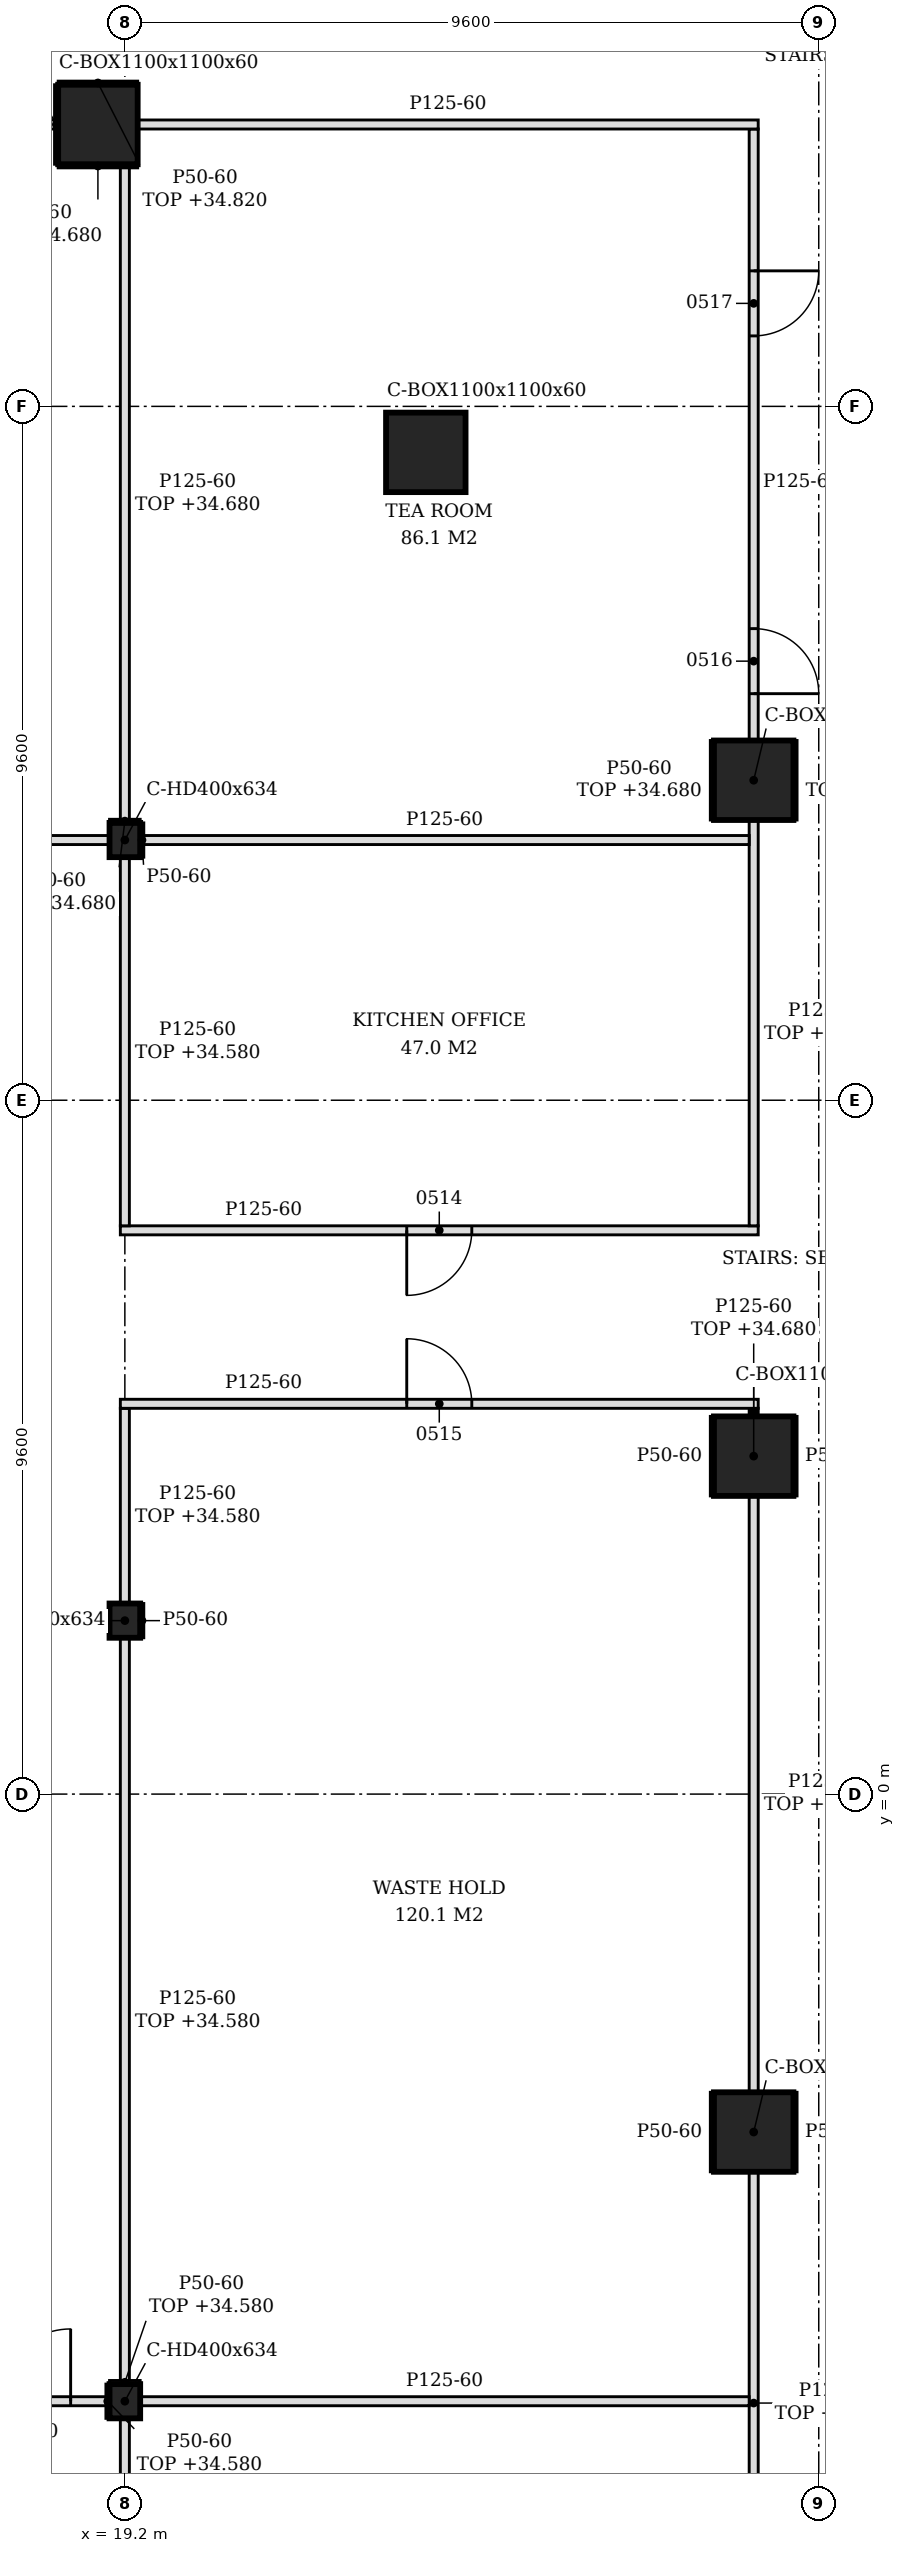
"""IFC4 building model, lengths in metres.
Left out: names, types, materials, properties, quantities, classifications, styles, units other than length and angle.
Written with IfcOpenShell. Run it as: python <this file> out.ifc"""

import sys

from ifc_helpers import new_model, si_unit, direction, frame, frame_2d, origin, origin_2d, place, context, subcontext, project, spatial, polyline, rectangle, hollow_rectangle, i_section, outline, extrude, element, fill, save


model = new_model("IFC4")
c1 = context("Model", 3, precision=1e-05, world=origin(), true_north=direction((0.0, 1.0)))
c2 = subcontext(c1, "Body", "Model", "MODEL_VIEW")
j1 = project(units=[si_unit("LENGTHUNIT", "METRE"), si_unit("PLANEANGLEUNIT", "RADIAN")], contexts=[c1])
p1 = place(None, origin())
s1 = spatial("IfcSite", under=j1, at=p1, CompositionType="ELEMENT")
p2 = place(p1, origin())
s2 = spatial("IfcBuilding", under=s1, at=p2, CompositionType="ELEMENT")
p3 = place(p2, frame((0.0, 0.0, 30.6)))
s3 = spatial("IfcBuildingStorey", under=s2, at=p3, CompositionType="ELEMENT", Elevation=30.6)
for number, where, z_axis, x_axis in (
    (1, (27.9, -4.676, -0.2), (0.0, 0.0, 1.0), (1.0, 0.0, 0.0)),
    (2, (27.9, 4.676, -0.2), (0.0, 0.0, 1.0), (1.0, 0.0, 0.0)),
    (3, (27.9, 14.027, -0.2), (0.0, 0.0, 1.0), (1.0, 0.0, 0.0)),
    (4, (23.364, 18.564, -0.2), (0.0, 0.0, 1.0), (1.0, 0.0, 0.0)),
    (5, (18.827, 23.1, -0.2), (0.0, 0.0, 1.0), (1.0, 0.0, 0.0)),
):
    element("IfcColumn", number, at=place(p3, frame(where, z_axis=z_axis, x_axis=x_axis)), inside=s3, PredefinedType="COLUMN", context=c2, shape_type="SweptSolid", body=[
        extrude(hollow_rectangle(XDim=1.1, YDim=1.1, WallThickness=0.06, at=origin_2d()), origin(), (0.0, 0.0, 1.0), 4.8),
    ])
for number, where, z_axis, x_axis in (
    (6, (19.2, -8.4, -0.2), (0.0, 0.0, 1.0), (1.0, 0.0, 0.0)),
    (7, (19.2, 2.4, -0.2), (0.0, 0.0, 1.0), (1.0, 0.0, 0.0)),
    (8, (19.2, 13.2, -0.2), (0.0, 0.0, 1.0), (1.0, 0.0, 0.0)),
):
    element("IfcColumn", number, at=place(p3, frame(where, z_axis=z_axis, x_axis=x_axis)), inside=s3, PredefinedType="COLUMN", context=c2, shape_type="SweptSolid", body=[
        extrude(i_section(OverallWidth=0.424, OverallDepth=0.474, WebThickness=0.048, FlangeThickness=0.077, FilletRadius=0.015, at=origin_2d()), origin(), (0.0, 0.0, 1.0), 4.8),
    ])
p4 = place(p3, frame((19.2, -22.55, 0.0), z_axis=(0.0, 0.0, 1.0), x_axis=(0.0, 1.0, 0.0)))
e9 = element("IfcWall", 9, at=p4, inside=s3, PredefinedType="PARTITIONING", context=c2, shape_type="SweptSolid", body=[
    extrude(rectangle(XDim=13.913, YDim=0.125, at=frame_2d((6.957, 0.0))), origin(), (0.0, 0.0, 1.0), 3.98),
])
p5 = place(p3, frame((27.9, -13.477, 0.0), z_axis=(0.0, 0.0, 1.0), x_axis=(0.0, 1.0, 0.0)))
e10 = element("IfcWall", 10, at=p5, inside=s3, PredefinedType="PARTITIONING", context=c2, shape_type="SweptSolid", body=[
    extrude(rectangle(XDim=8.252, YDim=0.125, at=frame_2d((4.126, 0.0))), origin(), (0.0, 0.0, 1.0), 4.08),
])
p6 = place(p5, frame((0.952, 0.0, 0.0)))
e11 = element("IfcOpeningElement", 11, at=p6, cuts=e10, PredefinedType="OPENING", context=c2, shape_type="SweptSolid", body=[
    extrude(rectangle(XDim=0.9, YDim=2.1, at=frame_2d((0.45, 1.05))), frame((0.0, 0.073, 0.0), z_axis=(0.0, -1.0, 0.0), x_axis=(1.0, 0.0, 0.0)), (0.0, 0.0, 1.0), 0.145),
])
p7 = place(p3, frame((7.412, -8.4, 0.0), z_axis=(0.0, 0.0, 1.0), x_axis=(1.0, 0.0, 0.0)))
e12 = element("IfcWall", 12, at=p7, inside=s3, PredefinedType="PARTITIONING", context=c2, shape_type="SweptSolid", body=[
    extrude(rectangle(XDim=11.576, YDim=0.125, at=frame_2d((5.788, 0.0))), origin(), (0.0, 0.0, 1.0), 3.98),
])
p8 = place(p7, frame((4.138, 0.0, 0.0)))
e13 = element("IfcOpeningElement", 13, at=p8, cuts=e12, PredefinedType="OPENING", context=c2, shape_type="SweptSolid", body=[
    extrude(rectangle(XDim=0.8, YDim=2.1, at=frame_2d((0.4, 1.05))), frame((0.0, 0.073, 0.0), z_axis=(0.0, -1.0, 0.0), x_axis=(1.0, 0.0, 0.0)), (0.0, 0.0, 1.0), 0.145),
])
p9 = place(p7, frame((10.038, 0.0, 0.0)))
e14 = element("IfcOpeningElement", 14, at=p9, cuts=e12, PredefinedType="OPENING", context=c2, shape_type="SweptSolid", body=[
    extrude(rectangle(XDim=1.0, YDim=2.1, at=frame_2d((0.5, 1.05))), frame((0.0, 0.073, 0.0), z_axis=(0.0, -1.0, 0.0), x_axis=(1.0, 0.0, 0.0)), (0.0, 0.0, 1.0), 0.145),
])
p10 = place(p3, frame((19.412, -8.4, 0.0), z_axis=(0.0, 0.0, 1.0), x_axis=(1.0, 0.0, 0.0)))
e15 = element("IfcWall", 15, at=p10, inside=s3, PredefinedType="PARTITIONING", context=c2, shape_type="SweptSolid", body=[
    extrude(outline(polyline([(0.0, 0.0), (8.425, 0.0), (8.426, 4.08), (8.338, 4.08), (8.336, 4.6), (0.0, 4.6), (0.0, 0.0)])), frame((0.0, 0.062, 0.0), z_axis=(0.0, -1.0, 0.0), x_axis=(1.0, 0.0, 0.0)), (0.0, 0.0, 1.0), 0.125),
])
p11 = place(p3, frame((19.2, -8.163, 0.0), z_axis=(0.0, 0.0, 1.0), x_axis=(0.0, 1.0, 0.0)))
e16 = element("IfcWall", 16, at=p11, inside=s3, PredefinedType="PARTITIONING", context=c2, shape_type="SweptSolid", body=[
    extrude(rectangle(XDim=10.326, YDim=0.125, at=frame_2d((5.163, 0.0))), origin(), (0.0, 0.0, 1.0), 3.98),
])
p12 = place(p3, frame((27.9, -4.126, 0.0), z_axis=(0.0, 0.0, 1.0), x_axis=(0.0, 1.0, 0.0)))
e17 = element("IfcWall", 17, at=p12, inside=s3, PredefinedType="PARTITIONING", context=c2, shape_type="SweptSolid", body=[
    extrude(rectangle(XDim=8.251, YDim=0.125, at=frame_2d((4.126, 0.0))), origin(), (0.0, 0.0, 1.0), 4.08),
])
p13 = place(p3, frame((19.2, 2.637, 0.0), z_axis=(0.0, 0.0, 1.0), x_axis=(0.0, 1.0, 0.0)))
e18 = element("IfcWall", 18, at=p13, inside=s3, PredefinedType="PARTITIONING", context=c2, shape_type="SweptSolid", body=[
    extrude(rectangle(XDim=2.7, YDim=0.125, at=frame_2d((1.35, 0.0))), origin(), (0.0, 0.0, 1.0), 3.98),
])
p14 = place(p3, frame((27.9, 5.226, 0.0), z_axis=(0.0, 0.0, 1.0), x_axis=(0.0, 1.0, 0.0)))
e19 = element("IfcWall", 19, at=p14, inside=s3, PredefinedType="PARTITIONING", context=c2, shape_type="SweptSolid", body=[
    extrude(rectangle(XDim=0.112, YDim=0.125, at=frame_2d((0.056, 0.0))), origin(), (0.0, 0.0, 1.0), 4.08),
])
p15 = place(p3, frame((19.137, 5.4, 0.0), z_axis=(0.0, 0.0, 1.0), x_axis=(1.0, 0.0, 0.0)))
e20 = element("IfcWall", 20, at=p15, inside=s3, PredefinedType="PARTITIONING", context=c2, shape_type="SweptSolid", body=[
    extrude(outline(polyline([(0.0, 0.0), (8.825, 0.0), (8.825, 4.08), (8.613, 4.08), (8.611, 4.6), (4.962, 4.6), (4.96, 4.08), (4.762, 4.08), (4.76, 4.6), (0.212, 4.6), (0.21, 3.98), (0.0, 3.98), (0.0, 0.0)])), frame((0.0, 0.062, 0.0), z_axis=(0.0, -1.0, 0.0), x_axis=(1.0, 0.0, 0.0)), (0.0, 0.0, 1.0), 0.125),
])
p16 = place(p15, frame((3.962, 0.0, 0.0)))
e21 = element("IfcOpeningElement", 21, at=p16, cuts=e20, PredefinedType="OPENING", context=c2, shape_type="SweptSolid", body=[
    extrude(rectangle(XDim=0.9, YDim=2.1, at=frame_2d((0.45, 1.05))), frame((0.0, 0.073, 0.0), z_axis=(0.0, -1.0, 0.0), x_axis=(1.0, 0.0, 0.0)), (0.0, 0.0, 1.0), 0.145),
])
p17 = place(p3, frame((19.137, 7.8, 0.0), z_axis=(0.0, 0.0, 1.0), x_axis=(1.0, 0.0, 0.0)))
e22 = element("IfcWall", 22, at=p17, inside=s3, PredefinedType="PARTITIONING", context=c2, shape_type="SweptSolid", body=[
    extrude(outline(polyline([(0.0, 0.0), (8.825, 0.0), (8.825, 4.08), (8.613, 4.08), (8.611, 4.6), (4.962, 4.6), (4.96, 4.08), (4.762, 4.08), (4.76, 4.6), (0.212, 4.6), (0.21, 3.98), (0.0, 3.98), (0.0, 0.0)])), frame((0.0, 0.062, 0.0), z_axis=(0.0, -1.0, 0.0), x_axis=(1.0, 0.0, 0.0)), (0.0, 0.0, 1.0), 0.125),
])
p18 = place(p17, frame((3.962, 0.0, 0.0)))
e23 = element("IfcOpeningElement", 23, at=p18, cuts=e22, PredefinedType="OPENING", context=c2, shape_type="SweptSolid", body=[
    extrude(rectangle(XDim=0.9, YDim=2.1, at=frame_2d((0.45, 1.05))), frame((0.0, 0.073, 0.0), z_axis=(0.0, -1.0, 0.0), x_axis=(1.0, 0.0, 0.0)), (0.0, 0.0, 1.0), 0.145),
])
p19 = place(p3, frame((19.2, 7.863, 0.0), z_axis=(0.0, 0.0, 1.0), x_axis=(0.0, 1.0, 0.0)))
e24 = element("IfcWall", 24, at=p19, inside=s3, PredefinedType="PARTITIONING", context=c2, shape_type="SweptSolid", body=[
    extrude(rectangle(XDim=5.1, YDim=0.125, at=frame_2d((2.55, 0.0))), origin(), (0.0, 0.0, 1.0), 3.98),
])
p20 = place(p3, frame((27.9, 7.863, 0.0), z_axis=(0.0, 0.0, 1.0), x_axis=(0.0, 1.0, 0.0)))
e25 = element("IfcWall", 25, at=p20, inside=s3, PredefinedType="PARTITIONING", context=c2, shape_type="SweptSolid", body=[
    extrude(rectangle(XDim=5.615, YDim=0.125, at=frame_2d((2.807, 0.0))), origin(), (0.0, 0.0, 1.0), 4.08),
])
p21 = place(p3, frame((7.412, 13.2, 0.0), z_axis=(0.0, 0.0, 1.0), x_axis=(1.0, 0.0, 0.0)))
e26 = element("IfcWall", 26, at=p21, inside=s3, PredefinedType="PARTITIONING", context=c2, shape_type="SweptSolid", body=[
    extrude(rectangle(XDim=11.576, YDim=0.125, at=frame_2d((5.788, 0.0))), origin(), (0.0, 0.0, 1.0), 3.98),
])
p22 = place(p21, frame((4.888, 0.0, 0.0)))
e27 = element("IfcOpeningElement", 27, at=p22, cuts=e26, PredefinedType="OPENING", context=c2, shape_type="SweptSolid", body=[
    extrude(rectangle(XDim=1.8, YDim=2.1, at=frame_2d((0.9, 1.05))), frame((0.0, 0.073, 0.0), z_axis=(0.0, -1.0, 0.0), x_axis=(1.0, 0.0, 0.0)), (0.0, 0.0, 1.0), 0.145),
])
p23 = place(p3, frame((19.412, 13.2, 0.0), z_axis=(0.0, 0.0, 1.0), x_axis=(1.0, 0.0, 0.0)))
e28 = element("IfcWall", 28, at=p23, inside=s3, PredefinedType="PARTITIONING", context=c2, shape_type="SweptSolid", body=[
    extrude(outline(polyline([(0.0, 0.0), (8.425, 0.0), (8.426, 4.08), (8.338, 4.08), (8.336, 4.6), (4.678, 4.6), (4.676, 4.18), (4.498, 4.18), (4.496, 4.6), (0.0, 4.6), (0.0, 0.0)])), frame((0.0, 0.062, 0.0), z_axis=(0.0, -1.0, 0.0), x_axis=(1.0, 0.0, 0.0)), (0.0, 0.0, 1.0), 0.125),
])
p24 = place(p3, frame((19.2, 13.437, 0.0), z_axis=(0.0, 0.0, 1.0), x_axis=(0.0, 1.0, 0.0)))
e29 = element("IfcWall", 29, at=p24, inside=s3, PredefinedType="PARTITIONING", context=c2, shape_type="SweptSolid", body=[
    extrude(rectangle(XDim=9.113, YDim=0.125, at=frame_2d((4.557, 0.0))), origin(), (0.0, 0.0, 1.0), 4.08),
])
p25 = place(p3, frame((27.9, 14.577, 0.0), z_axis=(0.0, 0.0, 1.0), x_axis=(0.0, 1.0, 0.0)))
e30 = element("IfcWall", 30, at=p25, inside=s3, PredefinedType="PARTITIONING", context=c2, shape_type="SweptSolid", body=[
    extrude(outline(polyline([(0.0, 0.0), (8.46, 0.0), (8.46, 4.6), (4.713, 4.6), (4.711, 4.18), (4.533, 4.18), (4.531, 4.6), (0.0, 4.6), (0.0, 0.0)])), frame((0.0, 0.062, 0.0), z_axis=(0.0, -1.0, 0.0), x_axis=(1.0, 0.0, 0.0)), (0.0, 0.0, 1.0), 0.125),
])
p26 = place(p25, frame((0.648, 0.0, 0.0)))
e31 = element("IfcOpeningElement", 31, at=p26, cuts=e30, PredefinedType="OPENING", context=c2, shape_type="SweptSolid", body=[
    extrude(rectangle(XDim=0.9, YDim=2.1, at=frame_2d((0.45, 1.05))), frame((0.0, 0.073, 0.0), z_axis=(0.0, -1.0, 0.0), x_axis=(1.0, 0.0, 0.0)), (0.0, 0.0, 1.0), 0.145),
])
p27 = place(p25, frame((5.598, 0.0, 0.0)))
e32 = element("IfcOpeningElement", 32, at=p27, cuts=e30, PredefinedType="OPENING", context=c2, shape_type="SweptSolid", body=[
    extrude(rectangle(XDim=0.9, YDim=2.1, at=frame_2d((0.45, 1.05))), frame((0.0, 0.073, 0.0), z_axis=(0.0, -1.0, 0.0), x_axis=(1.0, 0.0, 0.0)), (0.0, 0.0, 1.0), 0.145),
])
p28 = place(p3, frame((9.964, 23.1, 0.0), z_axis=(0.0, 0.0, 1.0), x_axis=(1.0, 0.0, 0.0)))
e33 = element("IfcWall", 33, at=p28, inside=s3, PredefinedType="PARTITIONING", context=c2, shape_type="SweptSolid", body=[
    extrude(rectangle(XDim=8.313, YDim=0.125, at=frame_2d((4.157, 0.0))), origin(), (0.0, 0.0, 1.0), 4.08),
])
p29 = place(p3, frame((19.377, 23.1, 0.0), z_axis=(0.0, 0.0, 1.0), x_axis=(1.0, 0.0, 0.0)))
e34 = element("IfcWall", 34, at=p29, inside=s3, PredefinedType="PARTITIONING", context=c2, shape_type="SweptSolid", body=[
    extrude(rectangle(XDim=8.585, YDim=0.125, at=frame_2d((4.292, 0.0))), origin(), (0.0, 0.0, 1.0), 4.6),
])
p30 = place(p3, frame((18.963, -8.637, 0.0), z_axis=(0.0, 0.0, 1.0), x_axis=(0.0, 1.0, 0.0)))
e35 = element("IfcWall", 35, at=p30, inside=s3, PredefinedType="PARTITIONING", context=c2, shape_type="SweptSolid", body=[
    extrude(rectangle(XDim=0.474, YDim=0.05, at=frame_2d((0.237, 0.0))), origin(), (0.0, 0.0, 1.0), 3.98),
])
for number, where, z_axis, x_axis in (
    (36, (27.325, -5.226, 0.0), (0.0, 0.0, 1.0), (0.0, 1.0, 0.0)),
    (37, (28.475, -5.226, 0.0), (0.0, 0.0, 1.0), (0.0, 1.0, 0.0)),
    (38, (27.325, 4.126, 0.0), (0.0, 0.0, 1.0), (0.0, 1.0, 0.0)),
    (39, (28.475, 4.126, 0.0), (0.0, 0.0, 1.0), (0.0, 1.0, 0.0)),
):
    element("IfcWall", number, at=place(p3, frame(where, z_axis=z_axis, x_axis=x_axis)), inside=s3, PredefinedType="PARTITIONING", context=c2, shape_type="SweptSolid", body=[
        extrude(rectangle(XDim=1.1, YDim=0.05, at=frame_2d((0.55, 0.0))), origin(), (0.0, 0.0, 1.0), 4.6),
    ])
p31 = place(p3, frame((18.988, -8.138, 0.0), z_axis=(0.0, 0.0, 1.0), x_axis=(1.0, 0.0, 0.0)))
e40 = element("IfcWall", 40, at=p31, inside=s3, PredefinedType="PARTITIONING", context=c2, shape_type="SweptSolid", body=[
    extrude(rectangle(XDim=0.424, YDim=0.05, at=frame_2d((0.212, 0.0))), origin(), (0.0, 0.0, 1.0), 3.98),
])
p32 = place(p3, frame((19.437, 2.163, 0.0), z_axis=(0.0, 0.0, 1.0), x_axis=(0.0, 1.0, 0.0)))
e41 = element("IfcWall", 41, at=p32, inside=s3, PredefinedType="PARTITIONING", context=c2, shape_type="SweptSolid", body=[
    extrude(rectangle(XDim=0.474, YDim=0.05, at=frame_2d((0.237, 0.0))), origin(), (0.0, 0.0, 1.0), 4.6),
])
p33 = place(p3, frame((19.437, 12.963, 0.0), z_axis=(0.0, 0.0, 1.0), x_axis=(0.0, 1.0, 0.0)))
e42 = element("IfcWall", 42, at=p33, inside=s3, PredefinedType="PARTITIONING", context=c2, shape_type="SweptSolid", body=[
    extrude(rectangle(XDim=0.474, YDim=0.05, at=frame_2d((0.237, 0.0))), origin(), (0.0, 0.0, 1.0), 4.6),
])
for number, where, z_axis, x_axis in (
    (43, (27.325, 13.477, 0.0), (0.0, 0.0, 1.0), (0.0, 1.0, 0.0)),
    (44, (28.475, 13.477, 0.0), (0.0, 0.0, 1.0), (0.0, 1.0, 0.0)),
):
    element("IfcWall", number, at=place(p3, frame(where, z_axis=z_axis, x_axis=x_axis)), inside=s3, PredefinedType="PARTITIONING", context=c2, shape_type="SweptSolid", body=[
        extrude(rectangle(XDim=1.1, YDim=0.05, at=frame_2d((0.55, 0.0))), origin(), (0.0, 0.0, 1.0), 4.08),
    ])
p34 = place(p3, frame((18.988, 13.462, 0.0), z_axis=(0.0, 0.0, 1.0), x_axis=(1.0, 0.0, 0.0)))
e45 = element("IfcWall", 45, at=p34, inside=s3, PredefinedType="PARTITIONING", context=c2, shape_type="SweptSolid", body=[
    extrude(rectangle(XDim=0.424, YDim=0.05, at=frame_2d((0.212, 0.0))), origin(), (0.0, 0.0, 1.0), 4.08),
])
p35 = place(p3, frame((18.252, 22.55, 0.0), z_axis=(0.0, 0.0, 1.0), x_axis=(0.0, 1.0, 0.0)))
e46 = element("IfcWall", 46, at=p35, inside=s3, PredefinedType="PARTITIONING", context=c2, shape_type="SweptSolid", body=[
    extrude(rectangle(XDim=1.1, YDim=0.05, at=frame_2d((0.55, 0.0))), origin(), (0.0, 0.0, 1.0), 4.08),
])
p36 = place(p3, frame((18.277, 22.525, 0.0), z_axis=(0.0, 0.0, 1.0), x_axis=(1.0, 0.0, 0.0)))
e47 = element("IfcWall", 47, at=p36, inside=s3, PredefinedType="PARTITIONING", context=c2, shape_type="SweptSolid", body=[
    extrude(rectangle(XDim=1.1, YDim=0.05, at=frame_2d((0.55, 0.0))), origin(), (0.0, 0.0, 1.0), 4.08),
])
p37 = place(p3, frame((18.277, 23.675, 0.0), z_axis=(0.0, 0.0, 1.0), x_axis=(1.0, 0.0, 0.0)))
e48 = element("IfcWall", 48, at=p37, inside=s3, PredefinedType="PARTITIONING", context=c2, shape_type="SweptSolid", body=[
    extrude(rectangle(XDim=1.1, YDim=0.05, at=frame_2d((0.55, 0.0))), origin(), (0.0, 0.0, 1.0), 4.22),
])
p38 = place(p9, origin())
e49 = element("IfcDoor", 49, at=p38, inside=s3, OperationType="SINGLE_SWING_RIGHT", PredefinedType="DOOR", context=c2, shape_type="SweptSolid", body=[
    extrude(rectangle(XDim=1.0, YDim=2.1, at=frame_2d((0.5, 1.05))), frame((0.0, 0.025, 0.0), z_axis=(0.0, -1.0, 0.0), x_axis=(1.0, 0.0, 0.0)), (0.0, 0.0, 1.0), 0.05),
])
fill(e14, e49)
p39 = place(p18, frame((0.9, 0.0, 0.0), z_axis=(0.0, 0.0, 1.0), x_axis=(-1.0, 0.0, 0.0)))
e50 = element("IfcDoor", 50, at=p39, inside=s3, OperationType="SINGLE_SWING_RIGHT", PredefinedType="DOOR", context=c2, shape_type="SweptSolid", body=[
    extrude(rectangle(XDim=0.9, YDim=2.1, at=frame_2d((0.45, 1.05))), frame((0.0, 0.025, 0.0), z_axis=(0.0, -1.0, 0.0), x_axis=(1.0, 0.0, 0.0)), (0.0, 0.0, 1.0), 0.05),
])
fill(e23, e50)
p40 = place(p16, origin())
e51 = element("IfcDoor", 51, at=p40, inside=s3, OperationType="SINGLE_SWING_LEFT", PredefinedType="DOOR", context=c2, shape_type="SweptSolid", body=[
    extrude(rectangle(XDim=0.9, YDim=2.1, at=frame_2d((0.45, 1.05))), frame((0.0, 0.025, 0.0), z_axis=(0.0, -1.0, 0.0), x_axis=(1.0, 0.0, 0.0)), (0.0, 0.0, 1.0), 0.05),
])
fill(e21, e51)
p41 = place(p26, frame((0.9, 0.0, 0.0), z_axis=(0.0, 0.0, 1.0), x_axis=(-1.0, 0.0, 0.0)))
e52 = element("IfcDoor", 52, at=p41, inside=s3, OperationType="SINGLE_SWING_RIGHT", PredefinedType="DOOR", context=c2, shape_type="SweptSolid", body=[
    extrude(rectangle(XDim=0.9, YDim=2.1, at=frame_2d((0.45, 1.05))), frame((0.0, 0.025, 0.0), z_axis=(0.0, -1.0, 0.0), x_axis=(1.0, 0.0, 0.0)), (0.0, 0.0, 1.0), 0.05),
])
fill(e31, e52)
p42 = place(p27, frame((0.9, 0.0, 0.0), z_axis=(0.0, 0.0, 1.0), x_axis=(-1.0, 0.0, 0.0)))
e53 = element("IfcDoor", 53, at=p42, inside=s3, OperationType="SINGLE_SWING_LEFT", PredefinedType="DOOR", context=c2, shape_type="SweptSolid", body=[
    extrude(rectangle(XDim=0.9, YDim=2.1, at=frame_2d((0.45, 1.05))), frame((0.0, 0.025, 0.0), z_axis=(0.0, -1.0, 0.0), x_axis=(1.0, 0.0, 0.0)), (0.0, 0.0, 1.0), 0.05),
])
fill(e32, e53)
save(model, sys.argv[1])
